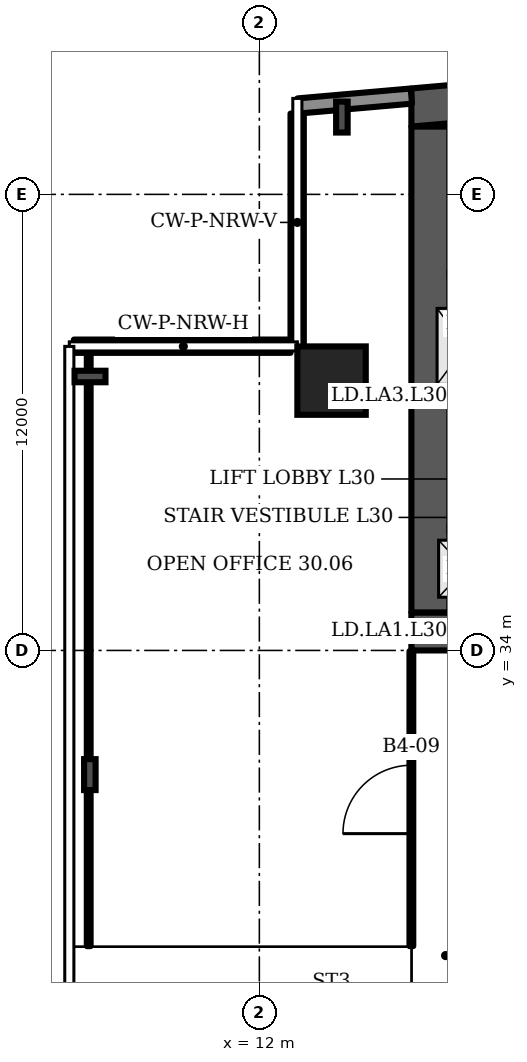
"""IFC4 building model, lengths in metres.
Left out: names, types, materials, properties, quantities, classifications, styles, units other than length and angle.
Written with IfcOpenShell. Run it as: python <this file> out.ifc"""

import sys

from ifc_helpers import new_model, si_unit, direction, frame, frame_2d, origin, origin_2d, place, context, subcontext, project, spatial, polyline, rectangle, i_section, outline, extrude, element, fill, save


model = new_model("IFC4")
c1 = context("Model", 3, precision=1e-05, world=origin(), true_north=direction((0.0, 1.0)))
c2 = subcontext(c1, "Body", "Model", "MODEL_VIEW")
j1 = project(units=[si_unit("LENGTHUNIT", "METRE"), si_unit("PLANEANGLEUNIT", "RADIAN")], contexts=[c1])
p1 = place(None, origin())
s1 = spatial("IfcSite", under=j1, at=p1, CompositionType="ELEMENT")
p2 = place(p1, origin())
s2 = spatial("IfcBuilding", under=s1, at=p2, CompositionType="ELEMENT")
p3 = place(p2, frame((0.0, 0.0, 129.1)))
s3 = spatial("IfcBuildingStorey", under=s2, at=p3, CompositionType="ELEMENT", Elevation=129.1)
p4 = place(p3, frame((0.0, 0.0, -0.0)))
e1 = element("IfcWall", 1, at=p4, inside=s3, PredefinedType="SHEAR", context=c2, shape_type="SweptSolid", body=[
    extrude(outline(polyline([(16.0, 47.784), (40.5, 49.927), (65.0, 47.784), (65.0, 48.787), (40.5, 50.931), (16.0, 48.787), (16.0, 47.784)])), origin(), (0.0, 0.0, 1.0), 3.6),
])
p5 = place(p3, frame((16.0, 34.5, 0.0), z_axis=(0.0, 0.0, 1.0), x_axis=(1.0, 0.0, 0.0)))
e2 = element("IfcWall", 2, at=p5, inside=s3, PredefinedType="SHEAR", context=c2, shape_type="SweptSolid", body=[
    extrude(rectangle(XDim=49.0, YDim=1.0, at=frame_2d((24.5, 0.0))), origin(), (0.0, 0.0, 1.0), 3.6),
])
p6 = place(p5, frame((1.2, 0.0, 0.0)))
e3 = element("IfcOpeningElement", 3, at=p6, cuts=e2, PredefinedType="OPENING", context=c2, shape_type="SweptSolid", body=[
    extrude(rectangle(XDim=1.1, YDim=2.1, at=frame_2d((0.55, 1.05))), frame((0.0, 0.51, 0.0), z_axis=(0.0, -1.0, 0.0), x_axis=(1.0, 0.0, 0.0)), (0.0, 0.0, 1.0), 1.02),
])
p7 = place(p5, frame((5.083, 0.0, 0.0)))
e4 = element("IfcOpeningElement", 4, at=p7, cuts=e2, PredefinedType="OPENING", context=c2, shape_type="SweptSolid", body=[
    extrude(rectangle(XDim=1.1, YDim=2.1, at=frame_2d((0.55, 1.05))), frame((0.0, 0.51, 0.0), z_axis=(0.0, -1.0, 0.0), x_axis=(1.0, 0.0, 0.0)), (0.0, 0.0, 1.0), 1.02),
])
p8 = place(p5, frame((2.933, 0.0, 0.0)))
e5 = element("IfcOpeningElement", 5, at=p8, cuts=e2, PredefinedType="OPENING", context=c2, shape_type="SweptSolid", body=[
    extrude(rectangle(XDim=1.4, YDim=2.1, at=frame_2d((0.7, 1.05))), frame((0.0, 0.51, 0.0), z_axis=(0.0, -1.0, 0.0), x_axis=(1.0, 0.0, 0.0)), (0.0, 0.0, 1.0), 1.02),
])
p9 = place(p5, frame((7.65, 0.0, 0.0)))
e6 = element("IfcOpeningElement", 6, at=p9, cuts=e2, PredefinedType="OPENING", context=c2, shape_type="SweptSolid", body=[
    extrude(rectangle(XDim=1.2, YDim=2.1, at=frame_2d((0.6, 1.05))), frame((0.0, 0.51, 0.0), z_axis=(0.0, -1.0, 0.0), x_axis=(1.0, 0.0, 0.0)), (0.0, 0.0, 1.0), 1.02),
])
p10 = place(p5, frame((14.817, 0.0, 0.0)))
e7 = element("IfcOpeningElement", 7, at=p10, cuts=e2, PredefinedType="OPENING", context=c2, shape_type="SweptSolid", body=[
    extrude(rectangle(XDim=1.1, YDim=2.1, at=frame_2d((0.55, 1.05))), frame((0.0, 0.51, 0.0), z_axis=(0.0, -1.0, 0.0), x_axis=(1.0, 0.0, 0.0)), (0.0, 0.0, 1.0), 1.02),
])
p11 = place(p5, frame((19.083, 0.0, 0.0)))
e8 = element("IfcOpeningElement", 8, at=p11, cuts=e2, PredefinedType="OPENING", context=c2, shape_type="SweptSolid", body=[
    extrude(rectangle(XDim=1.1, YDim=2.1, at=frame_2d((0.55, 1.05))), frame((0.0, 0.51, 0.0), z_axis=(0.0, -1.0, 0.0), x_axis=(1.0, 0.0, 0.0)), (0.0, 0.0, 1.0), 1.02),
])
p12 = place(p5, frame((16.8, 0.0, 0.0)))
e9 = element("IfcOpeningElement", 9, at=p12, cuts=e2, PredefinedType="OPENING", context=c2, shape_type="SweptSolid", body=[
    extrude(rectangle(XDim=1.4, YDim=2.1, at=frame_2d((0.7, 1.05))), frame((0.0, 0.51, 0.0), z_axis=(0.0, -1.0, 0.0), x_axis=(1.0, 0.0, 0.0)), (0.0, 0.0, 1.0), 1.02),
])
p13 = place(p5, frame((21.817, 0.0, 0.0)))
e10 = element("IfcOpeningElement", 10, at=p13, cuts=e2, PredefinedType="OPENING", context=c2, shape_type="SweptSolid", body=[
    extrude(rectangle(XDim=1.1, YDim=2.1, at=frame_2d((0.55, 1.05))), frame((0.0, 0.51, 0.0), z_axis=(0.0, -1.0, 0.0), x_axis=(1.0, 0.0, 0.0)), (0.0, 0.0, 1.0), 1.02),
])
p14 = place(p5, frame((26.083, 0.0, 0.0)))
e11 = element("IfcOpeningElement", 11, at=p14, cuts=e2, PredefinedType="OPENING", context=c2, shape_type="SweptSolid", body=[
    extrude(rectangle(XDim=1.1, YDim=2.1, at=frame_2d((0.55, 1.05))), frame((0.0, 0.51, 0.0), z_axis=(0.0, -1.0, 0.0), x_axis=(1.0, 0.0, 0.0)), (0.0, 0.0, 1.0), 1.02),
])
p15 = place(p5, frame((33.15, 0.0, 0.0)))
e12 = element("IfcOpeningElement", 12, at=p15, cuts=e2, PredefinedType="OPENING", context=c2, shape_type="SweptSolid", body=[
    extrude(rectangle(XDim=1.2, YDim=2.1, at=frame_2d((0.6, 1.05))), frame((0.0, 0.51, 0.0), z_axis=(0.0, -1.0, 0.0), x_axis=(1.0, 0.0, 0.0)), (0.0, 0.0, 1.0), 1.02),
])
p16 = place(p5, frame((37.8, 0.0, 0.0)))
e13 = element("IfcOpeningElement", 13, at=p16, cuts=e2, PredefinedType="OPENING", context=c2, shape_type="SweptSolid", body=[
    extrude(rectangle(XDim=1.4, YDim=2.1, at=frame_2d((0.7, 1.05))), frame((0.0, 0.51, 0.0), z_axis=(0.0, -1.0, 0.0), x_axis=(1.0, 0.0, 0.0)), (0.0, 0.0, 1.0), 1.02),
])
p17 = place(p5, frame((42.817, 0.0, 0.0)))
e14 = element("IfcOpeningElement", 14, at=p17, cuts=e2, PredefinedType="OPENING", context=c2, shape_type="SweptSolid", body=[
    extrude(rectangle(XDim=1.1, YDim=2.1, at=frame_2d((0.55, 1.05))), frame((0.0, 0.51, 0.0), z_axis=(0.0, -1.0, 0.0), x_axis=(1.0, 0.0, 0.0)), (0.0, 0.0, 1.0), 1.02),
])
p18 = place(p5, frame((46.7, 0.0, 0.0)))
e15 = element("IfcOpeningElement", 15, at=p18, cuts=e2, PredefinedType="OPENING", context=c2, shape_type="SweptSolid", body=[
    extrude(rectangle(XDim=1.1, YDim=2.1, at=frame_2d((0.55, 1.05))), frame((0.0, 0.51, 0.0), z_axis=(0.0, -1.0, 0.0), x_axis=(1.0, 0.0, 0.0)), (0.0, 0.0, 1.0), 1.02),
])
p19 = place(p5, frame((44.667, 0.0, 0.0)))
e16 = element("IfcOpeningElement", 16, at=p19, cuts=e2, PredefinedType="OPENING", context=c2, shape_type="SweptSolid", body=[
    extrude(rectangle(XDim=1.4, YDim=2.1, at=frame_2d((0.7, 1.05))), frame((0.0, 0.51, 0.0), z_axis=(0.0, -1.0, 0.0), x_axis=(1.0, 0.0, 0.0)), (0.0, 0.0, 1.0), 1.02),
])
p20 = place(p3, frame((16.5, 35.0, 0.0), z_axis=(0.0, 0.0, 1.0), x_axis=(0.0, 1.0, 0.0)))
e17 = element("IfcWall", 17, at=p20, inside=s3, PredefinedType="SHEAR", context=c2, shape_type="SweptSolid", body=[
    extrude(rectangle(XDim=12.784, YDim=1.0, at=frame_2d((6.392, 0.0))), origin(), (0.0, 0.0, 1.0), 3.6),
])
p21 = place(p3, frame((13.9, 41.1, 0.0), z_axis=(0.0, 0.0, 1.0), x_axis=(1.0, 0.0, 0.0)))
e18 = element("IfcColumn", 18, at=p21, inside=s3, PredefinedType="COLUMN", context=c2, shape_type="SweptSolid", body=[
    extrude(rectangle(XDim=1.8, YDim=1.8, at=origin_2d()), origin(), (0.0, 0.0, 1.0), 3.6),
])
for number, where, z_axis, x_axis in (
    (19, (14.172, 48.034, 0.0), (0.0, 0.0, 1.0), (-1.0, 0.0, 0.0)),
    (20, (7.544, 41.208, 0.0), (0.0, 0.0, 1.0), (0.0, 1.0, 0.0)),
    (21, (7.54, 30.733, 0.0), (0.0, 0.0, 1.0), (-1.0, 0.0, 0.0)),
):
    element("IfcColumn", number, at=place(p3, frame(where, z_axis=z_axis, x_axis=x_axis)), inside=s3, PredefinedType="COLUMN", context=c2, shape_type="SweptSolid", body=[
        extrude(i_section(OverallWidth=0.303, OverallDepth=0.814, WebThickness=0.021, FlangeThickness=0.04, FilletRadius=0.03, at=origin_2d()), origin(), (0.0, 0.0, 1.0), 3.6),
    ])
p22 = place(p3, frame((16.0, 48.587, 0.0), z_axis=(0.0, 0.0, 1.0), x_axis=(-0.996194, -0.087168, 0.0)))
e22 = element("IfcWall", 22, at=p22, inside=s3, PredefinedType="SOLIDWALL", context=c2, shape_type="SweptSolid", body=[
    extrude(rectangle(XDim=2.994, YDim=0.4, at=frame_2d((1.497, 0.0))), origin(), (0.0, 0.0, 1.0), 3.2),
])
p23 = place(p3, frame((12.995, 48.126, 0.0), z_axis=(0.0, 0.0, 1.0), x_axis=(0.0, -1.0, 0.0)))
e23 = element("IfcWall", 23, at=p23, inside=s3, PredefinedType="SOLIDWALL", context=c2, shape_type="SweptSolid", body=[
    extrude(rectangle(XDim=6.126, YDim=0.35, at=frame_2d((3.063, 0.0))), origin(), (0.0, 0.0, 1.0), 1.0),
])
p24 = place(p3, frame((12.82, 42.005, 0.0), z_axis=(0.0, 0.0, 1.0), x_axis=(-1.0, 0.0, 0.0)))
e24 = element("IfcWall", 24, at=p24, inside=s3, PredefinedType="SOLIDWALL", context=c2, shape_type="SweptSolid", body=[
    extrude(rectangle(XDim=5.7, YDim=0.35, at=frame_2d((2.85, 0.0))), origin(), (0.0, 0.0, 1.0), 1.0),
])
p25 = place(p3, frame((7.51, 26.22, 0.0), z_axis=(0.0, 0.0, 1.0), x_axis=(0.0, 1.0, 0.0)))
e25 = element("IfcWall", 25, at=p25, inside=s3, PredefinedType="PARTITIONING", context=c2, shape_type="SweptSolid", body=[
    extrude(rectangle(XDim=15.76, YDim=0.1, at=frame_2d((7.88, 0.0))), origin(), (0.0, 0.0, 1.0), 2.58),
])
p26 = place(p3, frame((16.0, 26.22, 0.0), z_axis=(0.0, 0.0, 1.0), x_axis=(0.0, 1.0, 0.0)))
e26 = element("IfcWall", 26, at=p26, inside=s3, PredefinedType="PARTITIONING", context=c2, shape_type="SweptSolid", body=[
    extrude(rectangle(XDim=7.76, YDim=0.1, at=frame_2d((3.88, 0.0))), origin(), (0.0, 0.0, 1.0), 3.2),
])
p27 = place(p26, frame((2.96, 0.0, 0.0)))
e27 = element("IfcOpeningElement", 27, at=p27, cuts=e26, PredefinedType="OPENING", context=c2, shape_type="SweptSolid", body=[
    extrude(rectangle(XDim=1.8, YDim=2.1, at=frame_2d((0.9, 1.05))), frame((0.0, 0.06, 0.0), z_axis=(0.0, -1.0, 0.0), x_axis=(1.0, 0.0, 0.0)), (0.0, 0.0, 1.0), 0.12),
])
p28 = place(p27, origin())
e28 = element("IfcDoor", 28, at=p28, inside=s3, OperationType="DOUBLE_DOOR_SINGLE_SWING", PredefinedType="DOOR", context=c2, shape_type="SweptSolid", body=[
    extrude(rectangle(XDim=1.8, YDim=2.1, at=frame_2d((0.9, 1.05))), frame((0.0, 0.025, 0.0), z_axis=(0.0, -1.0, 0.0), x_axis=(1.0, 0.0, 0.0)), (0.0, 0.0, 1.0), 0.05),
])
fill(e27, e28)
save(model, sys.argv[1])
